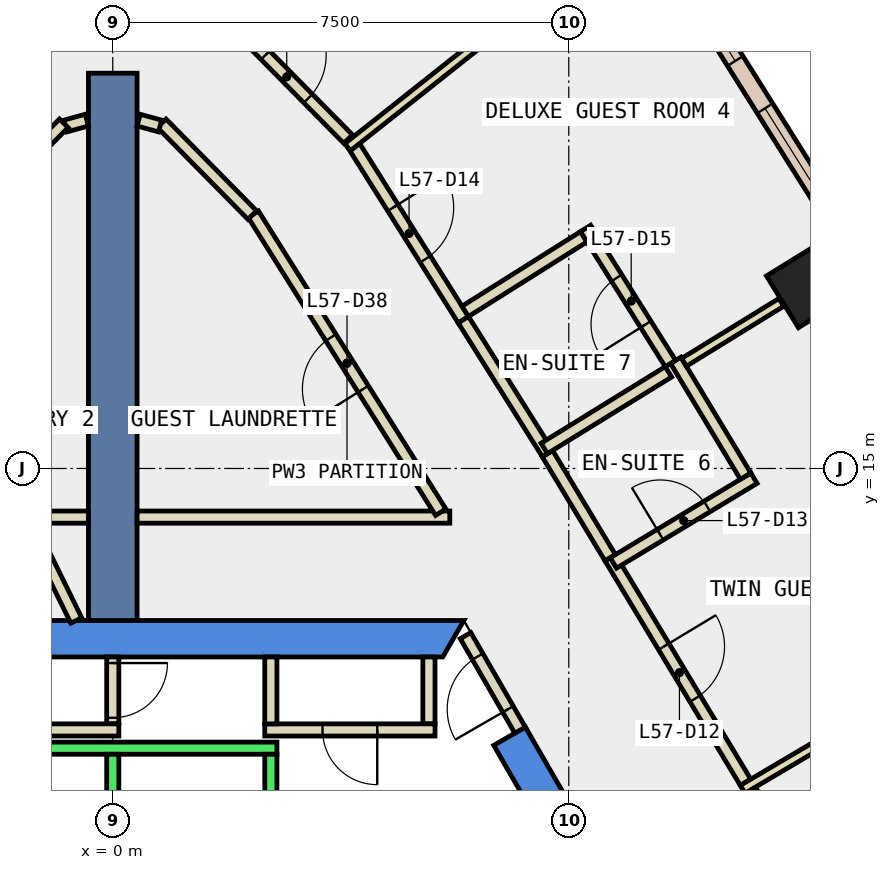
"""IFC4 building model, lengths in metres.
Left out: names, types, materials, properties, quantities, classifications, styles, units other than length and angle.
Written with IfcOpenShell. Run it as: python <this file> out.ifc"""

import sys

from ifc_helpers import new_model, si_unit, direction, frame, frame_2d, origin, origin_2d, place, context, subcontext, project, spatial, polyline, rectangle, outline, extrude, element, fill, save


model = new_model("IFC4")
c1 = context("Model", 3, precision=1e-05, world=origin(), true_north=direction((0.0, 1.0)))
c2 = subcontext(c1, "Body", "Model", "MODEL_VIEW")
j1 = project(units=[si_unit("LENGTHUNIT", "METRE"), si_unit("PLANEANGLEUNIT", "RADIAN")], contexts=[c1])
p1 = place(None, origin())
s1 = spatial("IfcSite", under=j1, at=p1, CompositionType="ELEMENT")
p2 = place(p1, origin())
s2 = spatial("IfcBuilding", under=s1, at=p2, CompositionType="ELEMENT")
p3 = place(p2, frame((0.0, 0.0, 252.2)))
s3 = spatial("IfcBuildingStorey", under=s2, at=p3, CompositionType="ELEMENT", Elevation=252.2)
p4 = place(p3, frame((11.61, 18.109, -0.34), z_axis=(0.0, 0.0, 1.0), x_axis=(-0.525575593337, 0.850746904601, 0.0)))
e1 = element("IfcColumn", 1, at=p4, inside=s3, PredefinedType="COLUMN", context=c2, shape_type="SweptSolid", body=[
    extrude(rectangle(XDim=1.0, YDim=1.4, at=origin_2d()), origin(), (0.0, 0.0, 1.0), 3.6),
])
p5 = place(p3, frame((0.0, 0.0, -0.34)))
e2 = element("IfcWall", 2, at=p5, inside=s3, PredefinedType="SHEAR", context=c2, shape_type="SweptSolid", body=[
    extrude(outline(polyline([(6.786, 10.747), (6.266, 10.447), (10.854, 2.5), (11.547, 2.5), (6.786, 10.747)])), origin(), (0.0, 0.0, 1.0), 3.6),
])
p6 = place(p3, frame((0.0, 0.0, -0.34)))
e3 = element("IfcWall", 3, at=p6, inside=s3, PredefinedType="SHEAR", context=c2, shape_type="SweptSolid", body=[
    extrude(outline(polyline([(5.774, 12.5), (-5.774, 12.5), (-5.427, 11.9), (5.427, 11.9), (5.774, 12.5)])), origin(), (0.0, 0.0, 1.0), 3.6),
])
p7 = place(p3, frame((0.0, 12.5, -0.34), z_axis=(0.0, 0.0, 1.0), x_axis=(0.0, 1.0, 0.0)))
e4 = element("IfcWall", 4, at=p7, inside=s3, PredefinedType="SHEAR", context=c2, shape_type="SweptSolid", body=[
    extrude(rectangle(XDim=9.0, YDim=0.8, at=frame_2d((4.5, 0.0))), origin(), (0.0, 0.0, 1.0), 3.6),
])
p8 = place(p3, frame((11.983, 18.926, 0.0), z_axis=(0.0, 0.0, 1.0), x_axis=(-0.532558226688, 0.846393369059, 0.0)))
e5 = element("IfcWall", 5, at=p8, inside=s3, PredefinedType="STANDARD", context=c2, shape_type="SweptSolid", body=[
    extrude(rectangle(XDim=5.637, YDim=0.3, at=frame_2d((2.818, 0.0))), origin(), (0.0, 0.0, 1.0), 3.26),
])
p9 = place(p8, frame((0.459, 0.0, 0.9)))
e6 = element("IfcOpeningElement", 6, at=p9, cuts=e5, PredefinedType="OPENING", context=c2, shape_type="SweptSolid", body=[
    extrude(rectangle(XDim=1.9, YDim=2.0, at=frame_2d((0.95, 1.0))), frame((0.0, 0.16, 0.0), z_axis=(0.0, -1.0, 0.0), x_axis=(1.0, 0.0, 0.0)), (0.0, 0.0, 1.0), 0.32),
])
p10 = place(p8, frame((3.278, 0.0, 0.9)))
e7 = element("IfcOpeningElement", 7, at=p10, cuts=e5, PredefinedType="OPENING", context=c2, shape_type="SweptSolid", body=[
    extrude(rectangle(XDim=1.9, YDim=2.0, at=frame_2d((0.95, 1.0))), frame((0.0, 0.16, 0.0), z_axis=(0.0, -1.0, 0.0), x_axis=(1.0, 0.0, 0.0)), (0.0, 0.0, 1.0), 0.32),
])
p11 = place(p3, frame((-0.6, 12.5, 0.0), z_axis=(0.0, 0.0, 1.0), x_axis=(-0.440531456598, 0.897737175206, 0.0)))
e8 = element("IfcWall", 8, at=p11, inside=s3, PredefinedType="PARTITIONING", context=c2, shape_type="SweptSolid", body=[
    extrude(rectangle(XDim=1.918, YDim=0.2, at=frame_2d((0.959, 0.0))), origin(), (0.0, 0.0, 1.0), 3.26),
])
p12 = place(p3, frame((0.4, 14.2, 0.0), z_axis=(0.0, 0.0, 1.0), x_axis=(1.0, 0.0, 0.0)))
e9 = element("IfcWall", 9, at=p12, inside=s3, PredefinedType="PARTITIONING", context=c2, shape_type="SweptSolid", body=[
    extrude(rectangle(XDim=5.143, YDim=0.2, at=frame_2d((2.572, 0.0))), origin(), (0.0, 0.0, 1.0), 3.26),
])
p13 = place(p3, frame((5.394, 14.281, 0.0), z_axis=(0.0, 0.0, 1.0), x_axis=(-0.532551510955, 0.846397594621, 0.0)))
e10 = element("IfcWall", 10, at=p13, inside=s3, PredefinedType="PARTITIONING", context=c2, shape_type="SweptSolid", body=[
    extrude(rectangle(XDim=5.789, YDim=0.2, at=frame_2d((2.895, 0.0))), origin(), (0.0, 0.0, 1.0), 3.26),
])
p14 = place(p13, frame((2.394, 0.0, 0.0)))
e11 = element("IfcOpeningElement", 11, at=p14, cuts=e10, PredefinedType="OPENING", context=c2, shape_type="SweptSolid", body=[
    extrude(rectangle(XDim=1.0, YDim=2.1, at=frame_2d((0.5, 1.05))), frame((0.0, 0.11, 0.0), z_axis=(0.0, -1.0, 0.0), x_axis=(1.0, 0.0, 0.0)), (0.0, 0.0, 1.0), 0.22),
])
p15 = place(p3, frame((2.294, 19.167, 0.0), z_axis=(0.0, 0.0, 1.0), x_axis=(-0.70213913596, 0.712039769784, 0.0)))
e12 = element("IfcWall", 12, at=p15, inside=s3, PredefinedType="PARTITIONING", context=c2, shape_type="SweptSolid", body=[
    extrude(rectangle(XDim=2.121, YDim=0.2, at=frame_2d((1.06, 0.0))), origin(), (0.0, 0.0, 1.0), 3.26),
])
p16 = place(p3, frame((0.778, 20.632, 0.0), z_axis=(0.0, 0.0, 1.0), x_axis=(-0.964810127056, 0.262947558899, 0.0)))
e13 = element("IfcWall", 13, at=p16, inside=s3, PredefinedType="PARTITIONING", context=c2, shape_type="SweptSolid", body=[
    extrude(rectangle(XDim=0.365, YDim=0.2, at=frame_2d((0.183, 0.0))), origin(), (0.0, 0.0, 1.0), 3.26),
])
p17 = place(p3, frame((-1.334, 14.2, 0.0), z_axis=(0.0, 0.0, 1.0), x_axis=(1.0, 0.0, 0.0)))
e14 = element("IfcWall", 14, at=p17, inside=s3, PredefinedType="PARTITIONING", context=c2, shape_type="SweptSolid", body=[
    extrude(rectangle(XDim=0.934, YDim=0.2, at=frame_2d((0.467, 0.0))), origin(), (0.0, 0.0, 1.0), 3.26),
])
p18 = place(p3, frame((-0.426, 20.728, 0.0), z_axis=(0.0, 0.0, 1.0), x_axis=(-0.964810127056, -0.262947558899, 0.0)))
e15 = element("IfcWall", 15, at=p18, inside=s3, PredefinedType="PARTITIONING", context=c2, shape_type="SweptSolid", body=[
    extrude(rectangle(XDim=0.365, YDim=0.2, at=frame_2d((0.183, 0.0))), origin(), (0.0, 0.0, 1.0), 3.26),
])
p19 = place(p3, frame((-0.805, 20.677, 0.0), z_axis=(0.0, 0.0, 1.0), x_axis=(-0.70213913596, -0.712039769784, 0.0)))
e16 = element("IfcWall", 16, at=p19, inside=s3, PredefinedType="PARTITIONING", context=c2, shape_type="SweptSolid", body=[
    extrude(rectangle(XDim=2.121, YDim=0.2, at=frame_2d((1.06, 0.0))), origin(), (0.0, 0.0, 1.0), 3.26),
])
p20 = place(p3, frame((10.484, 9.71, 0.0), z_axis=(0.0, 0.0, 1.0), x_axis=(0.500034145141, -0.866005689181, 0.0)))
e17 = element("IfcWall", 17, at=p20, inside=s3, PredefinedType="PARTITIONING", context=c2, shape_type="SweptSolid", body=[
    extrude(rectangle(XDim=3.91, YDim=0.2, at=frame_2d((1.955, 0.0))), origin(), (0.0, 0.0, 1.0), 3.26),
])
p21 = place(p20, frame((1.505, 0.0, 0.0)))
e18 = element("IfcOpeningElement", 18, at=p21, cuts=e17, PredefinedType="OPENING", context=c2, shape_type="SweptSolid", body=[
    extrude(rectangle(XDim=1.0, YDim=2.1, at=frame_2d((0.5, 1.05))), frame((0.0, 0.11, 0.0), z_axis=(0.0, -1.0, 0.0), x_axis=(1.0, 0.0, 0.0)), (0.0, 0.0, 1.0), 0.22),
])
p22 = place(p3, frame((8.181, 13.532, 0.0), z_axis=(0.0, 0.0, 1.0), x_axis=(0.51625987265, -0.856431984393, 0.0)))
e19 = element("IfcWall", 19, at=p22, inside=s3, PredefinedType="PARTITIONING", context=c2, shape_type="SweptSolid", body=[
    extrude(rectangle(XDim=4.312, YDim=0.2, at=frame_2d((2.156, 0.0))), origin(), (0.0, 0.0, 1.0), 3.26),
])
p23 = place(p22, frame((1.706, 0.0, 0.0)))
e20 = element("IfcOpeningElement", 20, at=p23, cuts=e19, PredefinedType="OPENING", context=c2, shape_type="SweptSolid", body=[
    extrude(rectangle(XDim=1.0, YDim=2.1, at=frame_2d((0.5, 1.05))), frame((0.0, 0.11, 0.0), z_axis=(0.0, -1.0, 0.0), x_axis=(1.0, 0.0, 0.0)), (0.0, 0.0, 1.0), 0.22),
])
p24 = place(p3, frame((7.148, 15.245, 0.0), z_axis=(0.0, 0.0, 1.0), x_axis=(0.516361066184, -0.856370976463, 0.0)))
e21 = element("IfcWall", 21, at=p24, inside=s3, PredefinedType="PARTITIONING", context=c2, shape_type="SweptSolid", body=[
    extrude(rectangle(XDim=2.0, YDim=0.2, at=frame_2d((1.0, 0.0))), origin(), (0.0, 0.0, 1.0), 3.26),
])
p25 = place(p3, frame((3.928, 20.367, 0.0), z_axis=(0.0, 0.0, 1.0), x_axis=(0.532616247911, -0.846356858814, 0.0)))
e22 = element("IfcWall", 22, at=p25, inside=s3, PredefinedType="PARTITIONING", context=c2, shape_type="SweptSolid", body=[
    extrude(rectangle(XDim=3.451, YDim=0.2, at=frame_2d((1.726, 0.0))), origin(), (0.0, 0.0, 1.0), 3.26),
])
p26 = place(p25, frame((1.275, 0.0, 0.0)))
e23 = element("IfcOpeningElement", 23, at=p26, cuts=e22, PredefinedType="OPENING", context=c2, shape_type="SweptSolid", body=[
    extrude(rectangle(XDim=1.0, YDim=2.1, at=frame_2d((0.5, 1.05))), frame((0.0, 0.11, 0.0), z_axis=(0.0, -1.0, 0.0), x_axis=(1.0, 0.0, 0.0)), (0.0, 0.0, 1.0), 0.22),
])
p27 = place(p3, frame((5.766, 17.446, 0.0), z_axis=(0.0, 0.0, 1.0), x_axis=(0.532437006176, -0.846469629966, 0.0)))
e24 = element("IfcWall", 24, at=p27, inside=s3, PredefinedType="PARTITIONING", context=c2, shape_type="SweptSolid", body=[
    extrude(rectangle(XDim=2.599, YDim=0.2, at=frame_2d((1.299, 0.0))), origin(), (0.0, 0.0, 1.0), 3.26),
])
p28 = place(p3, frame((1.851, 22.464, 0.0), z_axis=(0.0, 0.0, 1.0), x_axis=(0.70237969133, -0.711802479068, 0.0)))
e25 = element("IfcWall", 25, at=p28, inside=s3, PredefinedType="PARTITIONING", context=c2, shape_type="SweptSolid", body=[
    extrude(rectangle(XDim=2.876, YDim=0.2, at=frame_2d((1.438, 0.0))), origin(), (0.0, 0.0, 1.0), 3.26),
])
p29 = place(p28, frame((0.938, 0.0, 0.0)))
e26 = element("IfcOpeningElement", 26, at=p29, cuts=e25, PredefinedType="OPENING", context=c2, shape_type="SweptSolid", body=[
    extrude(rectangle(XDim=1.0, YDim=2.1, at=frame_2d((0.5, 1.05))), frame((0.0, 0.11, 0.0), z_axis=(0.0, -1.0, 0.0), x_axis=(1.0, 0.0, 0.0)), (0.0, 0.0, 1.0), 0.22),
])
p30 = place(p3, frame((5.2, 11.9, 0.0), z_axis=(0.0, 0.0, 1.0), x_axis=(0.0, -1.0, 0.0)))
e27 = element("IfcWall", 27, at=p30, inside=s3, PredefinedType="PARTITIONING", context=c2, shape_type="SweptSolid", body=[
    extrude(rectangle(XDim=1.1, YDim=0.2, at=frame_2d((0.55, 0.0))), origin(), (0.0, 0.0, 1.0), 3.26),
])
p31 = place(p3, frame((5.3, 10.7, 0.0), z_axis=(0.0, 0.0, 1.0), x_axis=(-1.0, 0.0, 0.0)))
e28 = element("IfcWall", 28, at=p31, inside=s3, PredefinedType="PARTITIONING", context=c2, shape_type="SweptSolid", body=[
    extrude(rectangle(XDim=2.8, YDim=0.2, at=frame_2d((1.4, 0.0))), origin(), (0.0, 0.0, 1.0), 3.26),
])
p32 = place(p31, frame((0.95, 0.0, 0.0)))
e29 = element("IfcOpeningElement", 29, at=p32, cuts=e28, PredefinedType="OPENING", context=c2, shape_type="SweptSolid", body=[
    extrude(rectangle(XDim=0.9, YDim=2.1, at=frame_2d((0.45, 1.05))), frame((0.0, 0.11, 0.0), z_axis=(0.0, -1.0, 0.0), x_axis=(1.0, 0.0, 0.0)), (0.0, 0.0, 1.0), 0.22),
])
p33 = place(p3, frame((2.6, 10.8, 0.0), z_axis=(0.0, 0.0, 1.0), x_axis=(0.0, 1.0, 0.0)))
e30 = element("IfcWall", 30, at=p33, inside=s3, PredefinedType="PARTITIONING", context=c2, shape_type="SweptSolid", body=[
    extrude(rectangle(XDim=1.1, YDim=0.2, at=frame_2d((0.55, 0.0))), origin(), (0.0, 0.0, 1.0), 3.26),
])
p34 = place(p3, frame((0.0, 11.9, 0.0), z_axis=(0.0, 0.0, 1.0), x_axis=(0.0, -1.0, 0.0)))
e31 = element("IfcWall", 31, at=p34, inside=s3, PredefinedType="PARTITIONING", context=c2, shape_type="SweptSolid", body=[
    extrude(rectangle(XDim=1.1, YDim=0.2, at=frame_2d((0.55, 0.0))), origin(), (0.0, 0.0, 1.0), 3.26),
])
p35 = place(p34, frame((0.1, 0.0, 0.0)))
e32 = element("IfcOpeningElement", 32, at=p35, cuts=e31, PredefinedType="OPENING", context=c2, shape_type="SweptSolid", body=[
    extrude(rectangle(XDim=0.9, YDim=2.1, at=frame_2d((0.45, 1.05))), frame((0.0, 0.11, 0.0), z_axis=(0.0, -1.0, 0.0), x_axis=(1.0, 0.0, 0.0)), (0.0, 0.0, 1.0), 0.22),
])
p36 = place(p3, frame((0.1, 10.7, 0.0), z_axis=(0.0, 0.0, 1.0), x_axis=(-1.0, 0.0, 0.0)))
e33 = element("IfcWall", 33, at=p36, inside=s3, PredefinedType="PARTITIONING", context=c2, shape_type="SweptSolid", body=[
    extrude(rectangle(XDim=2.8, YDim=0.2, at=frame_2d((1.4, 0.0))), origin(), (0.0, 0.0, 1.0), 3.26),
])
p37 = place(p3, frame((10.36, 9.724, 0.0), z_axis=(0.0, 0.0, 1.0), x_axis=(0.861211954005, 0.508245974188, 0.0)))
e34 = element("IfcWall", 34, at=p37, inside=s3, PredefinedType="PARTITIONING", context=c2, shape_type="SweptSolid", body=[
    extrude(rectangle(XDim=4.681, YDim=0.15, at=frame_2d((2.34, 0.0))), origin(), (0.0, 0.0, 1.0), 3.26),
])
p38 = place(p3, frame((8.233, 13.446, 0.0), z_axis=(0.0, 0.0, 1.0), x_axis=(0.856373825811, 0.516356340589, 0.0)))
e35 = element("IfcWall", 35, at=p38, inside=s3, PredefinedType="PARTITIONING", context=c2, shape_type="SweptSolid", body=[
    extrude(rectangle(XDim=2.7, YDim=0.2, at=frame_2d((1.35, 0.0))), origin(), (0.0, 0.0, 1.0), 3.26),
])
p39 = place(p38, frame((0.9, 0.0, 0.0)))
e36 = element("IfcOpeningElement", 36, at=p39, cuts=e35, PredefinedType="OPENING", context=c2, shape_type="SweptSolid", body=[
    extrude(rectangle(XDim=0.9, YDim=2.1, at=frame_2d((0.45, 1.05))), frame((0.0, 0.11, 0.0), z_axis=(0.0, -1.0, 0.0), x_axis=(1.0, 0.0, 0.0)), (0.0, 0.0, 1.0), 0.22),
])
p40 = place(p3, frame((10.408, 14.874, 0.0), z_axis=(0.0, 0.0, 1.0), x_axis=(-0.516768967276, 0.856124894195, 0.0)))
e37 = element("IfcWall", 37, at=p40, inside=s3, PredefinedType="PARTITIONING", context=c2, shape_type="SweptSolid", body=[
    extrude(rectangle(XDim=2.225, YDim=0.2, at=frame_2d((1.113, 0.0))), origin(), (0.0, 0.0, 1.0), 3.26),
])
p41 = place(p3, frame((9.395, 16.746, 0.0), z_axis=(0.0, 0.0, 1.0), x_axis=(0.851524542888, 0.524314745987, 0.0)))
e38 = element("IfcWall", 38, at=p41, inside=s3, PredefinedType="PARTITIONING", context=c2, shape_type="SweptSolid", body=[
    extrude(rectangle(XDim=1.88, YDim=0.15, at=frame_2d((0.94, 0.0))), origin(), (0.0, 0.0, 1.0), 3.26),
])
p42 = place(p3, frame((7.097, 15.33, 0.0), z_axis=(0.0, 0.0, 1.0), x_axis=(0.851207242031, 0.524829716302, 0.0)))
e39 = element("IfcWall", 39, at=p42, inside=s3, PredefinedType="PARTITIONING", context=c2, shape_type="SweptSolid", body=[
    extrude(rectangle(XDim=2.399, YDim=0.2, at=frame_2d((1.199, 0.0))), origin(), (0.0, 0.0, 1.0), 3.26),
])
p43 = place(p3, frame((9.172, 16.725, 0.0), z_axis=(0.0, 0.0, 1.0), x_axis=(-0.532329646536, 0.846537150643, 0.0)))
e40 = element("IfcWall", 40, at=p43, inside=s3, PredefinedType="PARTITIONING", context=c2, shape_type="SweptSolid", body=[
    extrude(rectangle(XDim=2.625, YDim=0.2, at=frame_2d((1.312, 0.0))), origin(), (0.0, 0.0, 1.0), 3.26),
])
p44 = place(p43, frame((0.763, 0.0, 0.0)))
e41 = element("IfcOpeningElement", 41, at=p44, cuts=e40, PredefinedType="OPENING", context=c2, shape_type="SweptSolid", body=[
    extrude(rectangle(XDim=0.9, YDim=2.1, at=frame_2d((0.45, 1.05))), frame((0.0, 0.11, 0.0), z_axis=(0.0, -1.0, 0.0), x_axis=(1.0, 0.0, 0.0)), (0.0, 0.0, 1.0), 0.22),
])
p45 = place(p3, frame((7.744, 18.809, 0.0), z_axis=(0.0, 0.0, 1.0), x_axis=(-0.846360434059, -0.532610566605, 0.0)))
e42 = element("IfcWall", 42, at=p45, inside=s3, PredefinedType="PARTITIONING", context=c2, shape_type="SweptSolid", body=[
    extrude(rectangle(XDim=2.3, YDim=0.2, at=frame_2d((1.15, 0.0))), origin(), (0.0, 0.0, 1.0), 3.26),
])
p46 = place(p3, frame((3.863, 20.284, 0.0), z_axis=(0.0, 0.0, 1.0), x_axis=(0.783618453885, 0.621242399335, 0.0)))
e43 = element("IfcWall", 43, at=p46, inside=s3, PredefinedType="PARTITIONING", context=c2, shape_type="SweptSolid", body=[
    extrude(rectangle(XDim=4.717, YDim=0.15, at=frame_2d((2.358, 0.0))), origin(), (0.0, 0.0, 1.0), 3.26),
])
p47 = place(p3, frame((6.699, 10.697, 0.0), z_axis=(0.0, 0.0, 1.0), x_axis=(-0.499914839587, 0.866074565589, 0.0)))
e44 = element("IfcWall", 44, at=p47, inside=s3, PredefinedType="PARTITIONING", context=c2, shape_type="SweptSolid", body=[
    extrude(rectangle(XDim=1.794, YDim=0.2, at=frame_2d((0.897, 0.0))), origin(), (0.0, 0.0, 1.0), 2.4),
])
p48 = place(p47, frame((0.397, 0.0, 0.0)))
e45 = element("IfcOpeningElement", 45, at=p48, cuts=e44, PredefinedType="OPENING", context=c2, shape_type="SweptSolid", body=[
    extrude(rectangle(XDim=1.0, YDim=2.1, at=frame_2d((0.5, 1.05))), frame((0.0, 0.11, 0.0), z_axis=(0.0, -1.0, 0.0), x_axis=(1.0, 0.0, 0.0)), (0.0, 0.0, 1.0), 0.22),
])
p49 = place(p3, frame((2.7, 10.4, 0.0), z_axis=(0.0, 0.0, 1.0), x_axis=(-1.0, 0.0, 0.0)))
e46 = element("IfcWall", 46, at=p49, inside=s3, PredefinedType="STANDARD", context=c2, shape_type="SweptSolid", body=[
    extrude(rectangle(XDim=5.4, YDim=0.2, at=frame_2d((2.7, 0.0))), origin(), (0.0, 0.0, 1.0), 3.26),
])
for number, where, z_axis, x_axis in (
    (47, (2.6, 7.9, 0.0), (0.0, 0.0, 1.0), (0.0, 1.0, 0.0)),
    (48, (0.0, 7.9, 0.0), (0.0, 0.0, 1.0), (0.0, 1.0, 0.0)),
):
    element("IfcWall", number, at=place(p3, frame(where, z_axis=z_axis, x_axis=x_axis)), inside=s3, PredefinedType="STANDARD", context=c2, shape_type="SweptSolid", body=[
        extrude(rectangle(XDim=2.4, YDim=0.2, at=frame_2d((1.2, 0.0))), origin(), (0.0, 0.0, 1.0), 3.26),
    ])
p50 = place(p9, origin())
e49 = element("IfcWindow", 49, at=p50, inside=s3, PartitioningType="SINGLE_PANEL", PredefinedType="WINDOW", context=c2, shape_type="SweptSolid", body=[
    extrude(rectangle(XDim=1.9, YDim=2.0, at=frame_2d((0.95, 1.0))), frame((0.0, 0.03, 0.0), z_axis=(0.0, -1.0, 0.0), x_axis=(1.0, 0.0, 0.0)), (0.0, 0.0, 1.0), 0.06),
])
fill(e6, e49)
p51 = place(p10, origin())
e50 = element("IfcWindow", 50, at=p51, inside=s3, PartitioningType="SINGLE_PANEL", PredefinedType="WINDOW", context=c2, shape_type="SweptSolid", body=[
    extrude(rectangle(XDim=1.9, YDim=2.0, at=frame_2d((0.95, 1.0))), frame((0.0, 0.03, 0.0), z_axis=(0.0, -1.0, 0.0), x_axis=(1.0, 0.0, 0.0)), (0.0, 0.0, 1.0), 0.06),
])
fill(e7, e50)
p52 = place(p23, origin())
e51 = element("IfcDoor", 51, at=p52, inside=s3, OperationType="SINGLE_SWING_LEFT", PredefinedType="DOOR", context=c2, shape_type="SweptSolid", body=[
    extrude(rectangle(XDim=1.0, YDim=2.1, at=frame_2d((0.5, 1.05))), frame((0.0, 0.025, 0.0), z_axis=(0.0, -1.0, 0.0), x_axis=(1.0, 0.0, 0.0)), (0.0, 0.0, 1.0), 0.05),
])
fill(e20, e51)
p53 = place(p39, origin())
e52 = element("IfcDoor", 52, at=p53, inside=s3, OperationType="SINGLE_SWING_LEFT", PredefinedType="DOOR", context=c2, shape_type="SweptSolid", body=[
    extrude(rectangle(XDim=0.9, YDim=2.1, at=frame_2d((0.45, 1.05))), frame((0.0, 0.025, 0.0), z_axis=(0.0, -1.0, 0.0), x_axis=(1.0, 0.0, 0.0)), (0.0, 0.0, 1.0), 0.05),
])
fill(e36, e52)
p54 = place(p26, origin())
e53 = element("IfcDoor", 53, at=p54, inside=s3, OperationType="SINGLE_SWING_LEFT", PredefinedType="DOOR", context=c2, shape_type="SweptSolid", body=[
    extrude(rectangle(XDim=1.0, YDim=2.1, at=frame_2d((0.5, 1.05))), frame((0.0, 0.025, 0.0), z_axis=(0.0, -1.0, 0.0), x_axis=(1.0, 0.0, 0.0)), (0.0, 0.0, 1.0), 0.05),
])
fill(e23, e53)
p55 = place(p44, origin())
e54 = element("IfcDoor", 54, at=p55, inside=s3, OperationType="SINGLE_SWING_LEFT", PredefinedType="DOOR", context=c2, shape_type="SweptSolid", body=[
    extrude(rectangle(XDim=0.9, YDim=2.1, at=frame_2d((0.45, 1.05))), frame((0.0, 0.025, 0.0), z_axis=(0.0, -1.0, 0.0), x_axis=(1.0, 0.0, 0.0)), (0.0, 0.0, 1.0), 0.05),
])
fill(e41, e54)
p56 = place(p29, origin())
e55 = element("IfcDoor", 55, at=p56, inside=s3, OperationType="SINGLE_SWING_LEFT", PredefinedType="DOOR", context=c2, shape_type="SweptSolid", body=[
    extrude(rectangle(XDim=1.0, YDim=2.1, at=frame_2d((0.5, 1.05))), frame((0.0, 0.025, 0.0), z_axis=(0.0, -1.0, 0.0), x_axis=(1.0, 0.0, 0.0)), (0.0, 0.0, 1.0), 0.05),
])
fill(e26, e55)
p57 = place(p14, origin())
e56 = element("IfcDoor", 56, at=p57, inside=s3, OperationType="SINGLE_SWING_LEFT", PredefinedType="DOOR", context=c2, shape_type="SweptSolid", body=[
    extrude(rectangle(XDim=1.0, YDim=2.1, at=frame_2d((0.5, 1.05))), frame((0.0, 0.025, 0.0), z_axis=(0.0, -1.0, 0.0), x_axis=(1.0, 0.0, 0.0)), (0.0, 0.0, 1.0), 0.05),
])
fill(e11, e56)
p58 = place(p32, origin())
e57 = element("IfcDoor", 57, at=p58, inside=s3, OperationType="SINGLE_SWING_RIGHT", PredefinedType="DOOR", context=c2, shape_type="SweptSolid", body=[
    extrude(rectangle(XDim=0.9, YDim=2.1, at=frame_2d((0.45, 1.05))), frame((0.0, 0.025, 0.0), z_axis=(0.0, -1.0, 0.0), x_axis=(1.0, 0.0, 0.0)), (0.0, 0.0, 1.0), 0.05),
])
fill(e29, e57)
p59 = place(p35, origin())
e58 = element("IfcDoor", 58, at=p59, inside=s3, OperationType="SINGLE_SWING_LEFT", PredefinedType="DOOR", context=c2, shape_type="SweptSolid", body=[
    extrude(rectangle(XDim=0.9, YDim=2.1, at=frame_2d((0.45, 1.05))), frame((0.0, 0.025, 0.0), z_axis=(0.0, -1.0, 0.0), x_axis=(1.0, 0.0, 0.0)), (0.0, 0.0, 1.0), 0.05),
])
fill(e32, e58)
p60 = place(p48, origin())
e59 = element("IfcDoor", 59, at=p60, inside=s3, OperationType="SINGLE_SWING_LEFT", PredefinedType="DOOR", context=c2, shape_type="SweptSolid", body=[
    extrude(rectangle(XDim=1.0, YDim=2.1, at=frame_2d((0.5, 1.05))), frame((0.0, 0.025, 0.0), z_axis=(0.0, -1.0, 0.0), x_axis=(1.0, 0.0, 0.0)), (0.0, 0.0, 1.0), 0.05),
])
fill(e45, e59)
save(model, sys.argv[1])
